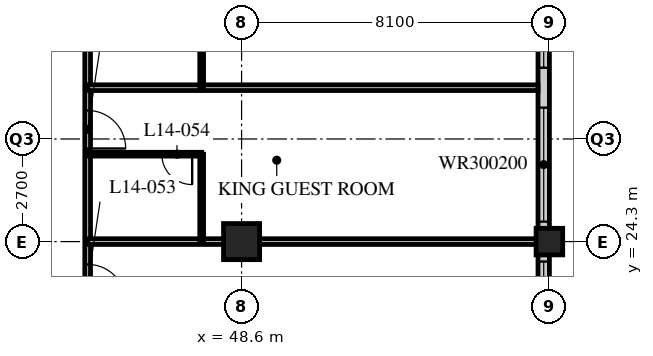
"""IFC4 building model, lengths in metres.
Left out: names, types, materials, properties, quantities, classifications, styles, units other than length and angle.
Written with IfcOpenShell. Run it as: python <this file> out.ifc"""

import sys

from ifc_helpers import new_model, si_unit, direction, frame, frame_2d, origin, origin_2d, place, context, subcontext, project, spatial, rectangle, hollow_rectangle, extrude, element, fill, save


model = new_model("IFC4")
c1 = context("Model", 3, precision=1e-05, world=origin(), true_north=direction((0.0, 1.0)))
c2 = subcontext(c1, "Body", "Model", "MODEL_VIEW")
j1 = project(units=[si_unit("LENGTHUNIT", "METRE"), si_unit("PLANEANGLEUNIT", "RADIAN")], contexts=[c1])
p1 = place(None, origin())
s1 = spatial("IfcSite", under=j1, at=p1, CompositionType="ELEMENT")
p2 = place(p1, origin())
s2 = spatial("IfcBuilding", under=s1, at=p2, CompositionType="ELEMENT")
p3 = place(p2, frame((0.0, 0.0, 60.2)))
s3 = spatial("IfcBuildingStorey", under=s2, at=p3, CompositionType="ELEMENT", Elevation=60.2)
p4 = place(p3, frame((48.6, 24.3, 0.0), z_axis=(0.0, 0.0, 1.0), x_axis=(1.0, 0.0, 0.0)))
e1 = element("IfcColumn", 1, at=p4, inside=s3, PredefinedType="COLUMN", context=c2, shape_type="SweptSolid", body=[
    extrude(hollow_rectangle(XDim=0.95, YDim=0.95, WallThickness=0.095, at=origin_2d()), origin(), (0.0, 0.0, 1.0), 3.4),
])
p5 = place(p3, frame((56.7, 24.3, 0.0), z_axis=(0.0, 0.0, 1.0), x_axis=(1.0, 0.0, 0.0)))
e2 = element("IfcColumn", 2, at=p5, inside=s3, PredefinedType="COLUMN", context=c2, shape_type="SweptSolid", body=[
    extrude(hollow_rectangle(XDim=0.7, YDim=0.7, WallThickness=0.06, at=origin_2d()), origin(), (0.0, 0.0, 1.0), 3.4),
])
p6 = place(p3, frame((56.55, 8.4, 0.0), z_axis=(0.0, 0.0, 1.0), x_axis=(0.0, 1.0, 0.0)))
e3 = element("IfcWall", 3, at=p6, inside=s3, PredefinedType="SOLIDWALL", context=c2, shape_type="SweptSolid", body=[
    extrude(rectangle(XDim=32.1, YDim=0.3, at=frame_2d((16.05, 0.0))), origin(), (0.0, 0.0, 1.0), 3.19),
])
p7 = place(p6, frame((0.225, 0.0, 0.9)))
e4 = element("IfcOpeningElement", 4, at=p7, cuts=e3, PredefinedType="OPENING", context=c2, shape_type="SweptSolid", body=[
    extrude(rectangle(XDim=3.0, YDim=2.0, at=frame_2d((1.5, 1.0))), frame((0.0, 0.16, 0.0), z_axis=(0.0, -1.0, 0.0), x_axis=(1.0, 0.0, 0.0)), (0.0, 0.0, 1.0), 0.32),
])
p8 = place(p6, frame((4.275, 0.0, 0.9)))
e5 = element("IfcOpeningElement", 5, at=p8, cuts=e3, PredefinedType="OPENING", context=c2, shape_type="SweptSolid", body=[
    extrude(rectangle(XDim=3.0, YDim=2.0, at=frame_2d((1.5, 1.0))), frame((0.0, 0.16, 0.0), z_axis=(0.0, -1.0, 0.0), x_axis=(1.0, 0.0, 0.0)), (0.0, 0.0, 1.0), 0.32),
])
p9 = place(p6, frame((8.325, 0.0, 0.9)))
e6 = element("IfcOpeningElement", 6, at=p9, cuts=e3, PredefinedType="OPENING", context=c2, shape_type="SweptSolid", body=[
    extrude(rectangle(XDim=3.0, YDim=2.0, at=frame_2d((1.5, 1.0))), frame((0.0, 0.16, 0.0), z_axis=(0.0, -1.0, 0.0), x_axis=(1.0, 0.0, 0.0)), (0.0, 0.0, 1.0), 0.32),
])
p10 = place(p6, frame((12.375, 0.0, 0.9)))
e7 = element("IfcOpeningElement", 7, at=p10, cuts=e3, PredefinedType="OPENING", context=c2, shape_type="SweptSolid", body=[
    extrude(rectangle(XDim=3.0, YDim=2.0, at=frame_2d((1.5, 1.0))), frame((0.0, 0.16, 0.0), z_axis=(0.0, -1.0, 0.0), x_axis=(1.0, 0.0, 0.0)), (0.0, 0.0, 1.0), 0.32),
])
p11 = place(p6, frame((16.425, 0.0, 0.9)))
e8 = element("IfcOpeningElement", 8, at=p11, cuts=e3, PredefinedType="OPENING", context=c2, shape_type="SweptSolid", body=[
    extrude(rectangle(XDim=3.0, YDim=2.0, at=frame_2d((1.5, 1.0))), frame((0.0, 0.16, 0.0), z_axis=(0.0, -1.0, 0.0), x_axis=(1.0, 0.0, 0.0)), (0.0, 0.0, 1.0), 0.32),
])
p12 = place(p6, frame((20.475, 0.0, 0.9)))
e9 = element("IfcOpeningElement", 9, at=p12, cuts=e3, PredefinedType="OPENING", context=c2, shape_type="SweptSolid", body=[
    extrude(rectangle(XDim=3.0, YDim=2.0, at=frame_2d((1.5, 1.0))), frame((0.0, 0.16, 0.0), z_axis=(0.0, -1.0, 0.0), x_axis=(1.0, 0.0, 0.0)), (0.0, 0.0, 1.0), 0.32),
])
p13 = place(p6, frame((24.525, 0.0, 0.9)))
e10 = element("IfcOpeningElement", 10, at=p13, cuts=e3, PredefinedType="OPENING", context=c2, shape_type="SweptSolid", body=[
    extrude(rectangle(XDim=3.0, YDim=2.0, at=frame_2d((1.5, 1.0))), frame((0.0, 0.16, 0.0), z_axis=(0.0, -1.0, 0.0), x_axis=(1.0, 0.0, 0.0)), (0.0, 0.0, 1.0), 0.32),
])
p14 = place(p6, frame((28.575, 0.0, 0.9)))
e11 = element("IfcOpeningElement", 11, at=p14, cuts=e3, PredefinedType="OPENING", context=c2, shape_type="SweptSolid", body=[
    extrude(rectangle(XDim=3.0, YDim=2.0, at=frame_2d((1.5, 1.0))), frame((0.0, 0.16, 0.0), z_axis=(0.0, -1.0, 0.0), x_axis=(1.0, 0.0, 0.0)), (0.0, 0.0, 1.0), 0.32),
])
p15 = place(p3, frame((44.55, 12.15, 0.0), z_axis=(0.0, 0.0, 1.0), x_axis=(0.0, 1.0, 0.0)))
e12 = element("IfcWall", 12, at=p15, inside=s3, PredefinedType="PARTITIONING", context=c2, shape_type="SweptSolid", body=[
    extrude(rectangle(XDim=30.15, YDim=0.15, at=frame_2d((15.075, 0.0))), origin(), (0.0, 0.0, 1.0), 3.19),
])
p16 = place(p15, frame((2.75, 0.0, 0.0)))
e13 = element("IfcOpeningElement", 13, at=p16, cuts=e12, PredefinedType="OPENING", context=c2, shape_type="SweptSolid", body=[
    extrude(rectangle(XDim=1.0, YDim=2.1, at=frame_2d((0.5, 1.05))), frame((0.0, 0.085, 0.0), z_axis=(0.0, -1.0, 0.0), x_axis=(1.0, 0.0, 0.0)), (0.0, 0.0, 1.0), 0.17),
])
p17 = place(p15, frame((6.5, 0.0, 0.0)))
e14 = element("IfcOpeningElement", 14, at=p17, cuts=e12, PredefinedType="OPENING", context=c2, shape_type="SweptSolid", body=[
    extrude(rectangle(XDim=1.0, YDim=2.1, at=frame_2d((0.5, 1.05))), frame((0.0, 0.085, 0.0), z_axis=(0.0, -1.0, 0.0), x_axis=(1.0, 0.0, 0.0)), (0.0, 0.0, 1.0), 0.17),
])
p18 = place(p15, frame((10.55, 0.0, 0.0)))
e15 = element("IfcOpeningElement", 15, at=p18, cuts=e12, PredefinedType="OPENING", context=c2, shape_type="SweptSolid", body=[
    extrude(rectangle(XDim=1.0, YDim=2.1, at=frame_2d((0.5, 1.05))), frame((0.0, 0.085, 0.0), z_axis=(0.0, -1.0, 0.0), x_axis=(1.0, 0.0, 0.0)), (0.0, 0.0, 1.0), 0.17),
])
p19 = place(p15, frame((14.6, 0.0, 0.0)))
e16 = element("IfcOpeningElement", 16, at=p19, cuts=e12, PredefinedType="OPENING", context=c2, shape_type="SweptSolid", body=[
    extrude(rectangle(XDim=1.0, YDim=2.1, at=frame_2d((0.5, 1.05))), frame((0.0, 0.085, 0.0), z_axis=(0.0, -1.0, 0.0), x_axis=(1.0, 0.0, 0.0)), (0.0, 0.0, 1.0), 0.17),
])
p20 = place(p15, frame((18.65, 0.0, 0.0)))
e17 = element("IfcOpeningElement", 17, at=p20, cuts=e12, PredefinedType="OPENING", context=c2, shape_type="SweptSolid", body=[
    extrude(rectangle(XDim=1.0, YDim=2.1, at=frame_2d((0.5, 1.05))), frame((0.0, 0.085, 0.0), z_axis=(0.0, -1.0, 0.0), x_axis=(1.0, 0.0, 0.0)), (0.0, 0.0, 1.0), 0.17),
])
p21 = place(p15, frame((22.7, 0.0, 0.0)))
e18 = element("IfcOpeningElement", 18, at=p21, cuts=e12, PredefinedType="OPENING", context=c2, shape_type="SweptSolid", body=[
    extrude(rectangle(XDim=1.0, YDim=2.1, at=frame_2d((0.5, 1.05))), frame((0.0, 0.085, 0.0), z_axis=(0.0, -1.0, 0.0), x_axis=(1.0, 0.0, 0.0)), (0.0, 0.0, 1.0), 0.17),
])
p22 = place(p15, frame((26.7, 0.0, 0.0)))
e19 = element("IfcOpeningElement", 19, at=p22, cuts=e12, PredefinedType="OPENING", context=c2, shape_type="SweptSolid", body=[
    extrude(rectangle(XDim=1.0, YDim=2.1, at=frame_2d((0.5, 1.05))), frame((0.0, 0.085, 0.0), z_axis=(0.0, -1.0, 0.0), x_axis=(1.0, 0.0, 0.0)), (0.0, 0.0, 1.0), 0.17),
])
p23 = place(p3, frame((44.55, 24.3, 0.0), z_axis=(0.0, 0.0, 1.0), x_axis=(1.0, 0.0, 0.0)))
e20 = element("IfcWall", 20, at=p23, inside=s3, PredefinedType="PARTITIONING", context=c2, shape_type="SweptSolid", body=[
    extrude(rectangle(XDim=11.85, YDim=0.15, at=frame_2d((5.925, 0.0))), origin(), (0.0, 0.0, 1.0), 2.578),
])
p24 = place(p3, frame((47.55, 24.3, 0.0), z_axis=(0.0, 0.0, 1.0), x_axis=(0.0, 1.0, 0.0)))
e21 = element("IfcWall", 21, at=p24, inside=s3, PredefinedType="PARTITIONING", context=c2, shape_type="SweptSolid", body=[
    extrude(rectangle(XDim=2.3, YDim=0.1, at=frame_2d((1.15, 0.0))), origin(), (0.0, 0.0, 1.0), 3.19),
])
p25 = place(p3, frame((44.55, 26.6, 0.0), z_axis=(0.0, 0.0, 1.0), x_axis=(1.0, 0.0, 0.0)))
e22 = element("IfcWall", 22, at=p25, inside=s3, PredefinedType="PARTITIONING", context=c2, shape_type="SweptSolid", body=[
    extrude(rectangle(XDim=3.0, YDim=0.1, at=frame_2d((1.5, 0.0))), origin(), (0.0, 0.0, 1.0), 3.19),
])
p26 = place(p25, frame((1.95, 0.0, 0.0)))
e23 = element("IfcOpeningElement", 23, at=p26, cuts=e22, PredefinedType="OPENING", context=c2, shape_type="SweptSolid", body=[
    extrude(rectangle(XDim=0.8, YDim=2.1, at=frame_2d((0.4, 1.05))), frame((0.0, 0.06, 0.0), z_axis=(0.0, -1.0, 0.0), x_axis=(1.0, 0.0, 0.0)), (0.0, 0.0, 1.0), 0.12),
])
p27 = place(p3, frame((44.55, 28.35, 0.0), z_axis=(0.0, 0.0, 1.0), x_axis=(1.0, 0.0, 0.0)))
e24 = element("IfcWall", 24, at=p27, inside=s3, PredefinedType="PARTITIONING", context=c2, shape_type="SweptSolid", body=[
    extrude(rectangle(XDim=11.85, YDim=0.15, at=frame_2d((5.925, 0.0))), origin(), (0.0, 0.0, 1.0), 3.19),
])
p28 = place(p3, frame((47.55, 28.35, 0.0), z_axis=(0.0, 0.0, 1.0), x_axis=(0.0, 1.0, 0.0)))
e25 = element("IfcWall", 25, at=p28, inside=s3, PredefinedType="PARTITIONING", context=c2, shape_type="SweptSolid", body=[
    extrude(rectangle(XDim=2.3, YDim=0.1, at=frame_2d((1.15, 0.0))), origin(), (0.0, 0.0, 1.0), 3.19),
])
p29 = place(p10, origin())
e26 = element("IfcWindow", 26, at=p29, inside=s3, PartitioningType="SINGLE_PANEL", PredefinedType="WINDOW", context=c2, shape_type="SweptSolid", body=[
    extrude(rectangle(XDim=3.0, YDim=2.0, at=frame_2d((1.5, 1.0))), frame((0.0, 0.03, 0.0), z_axis=(0.0, -1.0, 0.0), x_axis=(1.0, 0.0, 0.0)), (0.0, 0.0, 1.0), 0.06),
])
fill(e7, e26)
p30 = place(p11, origin())
e27 = element("IfcWindow", 27, at=p30, inside=s3, PartitioningType="SINGLE_PANEL", PredefinedType="WINDOW", context=c2, shape_type="SweptSolid", body=[
    extrude(rectangle(XDim=3.0, YDim=2.0, at=frame_2d((1.5, 1.0))), frame((0.0, 0.03, 0.0), z_axis=(0.0, -1.0, 0.0), x_axis=(1.0, 0.0, 0.0)), (0.0, 0.0, 1.0), 0.06),
])
fill(e8, e27)
p31 = place(p12, origin())
e28 = element("IfcWindow", 28, at=p31, inside=s3, PartitioningType="SINGLE_PANEL", PredefinedType="WINDOW", context=c2, shape_type="SweptSolid", body=[
    extrude(rectangle(XDim=3.0, YDim=2.0, at=frame_2d((1.5, 1.0))), frame((0.0, 0.03, 0.0), z_axis=(0.0, -1.0, 0.0), x_axis=(1.0, 0.0, 0.0)), (0.0, 0.0, 1.0), 0.06),
])
fill(e9, e28)
p32 = place(p18, origin())
e29 = element("IfcDoor", 29, at=p32, inside=s3, OperationType="SINGLE_SWING_RIGHT", PredefinedType="DOOR", context=c2, shape_type="SweptSolid", body=[
    extrude(rectangle(XDim=1.0, YDim=2.1, at=frame_2d((0.5, 1.05))), frame((0.0, 0.025, 0.0), z_axis=(0.0, -1.0, 0.0), x_axis=(1.0, 0.0, 0.0)), (0.0, 0.0, 1.0), 0.05),
])
fill(e15, e29)
p33 = place(p26, origin())
e30 = element("IfcDoor", 30, at=p33, inside=s3, OperationType="SINGLE_SWING_LEFT", PredefinedType="DOOR", context=c2, shape_type="SweptSolid", body=[
    extrude(rectangle(XDim=0.8, YDim=2.1, at=frame_2d((0.4, 1.05))), frame((0.0, 0.025, 0.0), z_axis=(0.0, -1.0, 0.0), x_axis=(1.0, 0.0, 0.0)), (0.0, 0.0, 1.0), 0.05),
])
fill(e23, e30)
p34 = place(p19, origin())
e31 = element("IfcDoor", 31, at=p34, inside=s3, OperationType="SINGLE_SWING_RIGHT", PredefinedType="DOOR", context=c2, shape_type="SweptSolid", body=[
    extrude(rectangle(XDim=1.0, YDim=2.1, at=frame_2d((0.5, 1.05))), frame((0.0, 0.025, 0.0), z_axis=(0.0, -1.0, 0.0), x_axis=(1.0, 0.0, 0.0)), (0.0, 0.0, 1.0), 0.05),
])
fill(e16, e31)
save(model, sys.argv[1])
